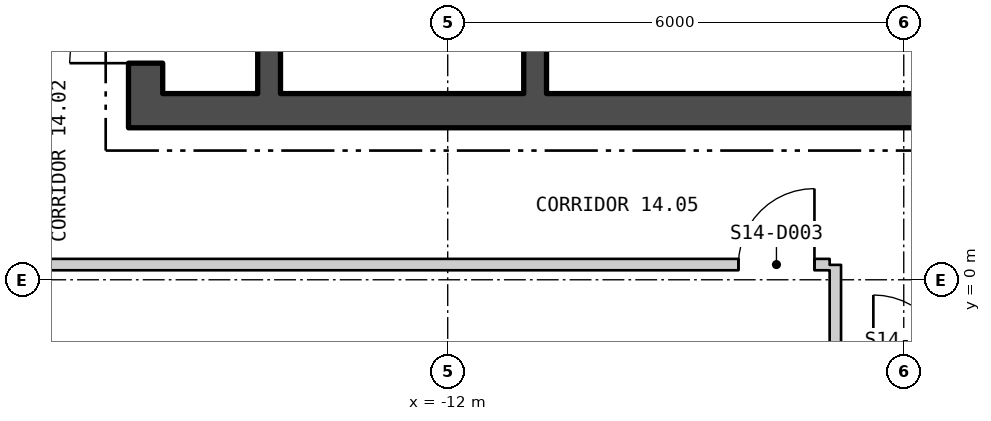
"""IFC4 building model, lengths in metres.
Left out: names, types, materials, properties, quantities, classifications, styles, units other than length and angle.
Written with IfcOpenShell. Run it as: python <this file> out.ifc"""

import sys

from ifc_helpers import new_model, si_unit, direction, frame, frame_2d, origin, place, context, subcontext, project, spatial, polyline, rectangle, outline, extrude, element, fill, save


model = new_model("IFC4")
c1 = context("Model", 3, precision=1e-05, world=origin(), true_north=direction((0.0, 1.0)))
c2 = subcontext(c1, "Body", "Model", "MODEL_VIEW")
j1 = project(units=[si_unit("LENGTHUNIT", "METRE"), si_unit("PLANEANGLEUNIT", "RADIAN")], contexts=[c1])
p1 = place(None, origin())
s1 = spatial("IfcSite", under=j1, at=p1, CompositionType="ELEMENT")
p2 = place(p1, origin())
s2 = spatial("IfcBuilding", under=s1, at=p2, CompositionType="ELEMENT")
p3 = place(p2, frame((0.0, 0.0, 192.6)))
s3 = spatial("IfcBuildingStorey", under=s2, at=p3, CompositionType="ELEMENT", Elevation=192.6)
p4 = place(p3, frame((-26.54, 13.618, -0.18), z_axis=(0.0, 0.0, 1.0), x_axis=(0.499999764979, -0.866025539474, 0.0)))
e1 = element("IfcWall", 1, at=p4, inside=s3, PredefinedType="SOLIDWALL", context=c2, shape_type="SweptSolid", body=[
    extrude(outline(polyline([(-0.13, -0.225), (45.87, -0.225), (45.61, 0.225), (0.13, 0.225), (-0.13, -0.225)])), origin(), (0.0, 0.0, 1.0), 3.68),
])
p5 = place(p4, frame((1.424, 0.0, 1.08)))
e2 = element("IfcOpeningElement", 2, at=p5, cuts=e1, PredefinedType="OPENING", context=c2, shape_type="SweptSolid", body=[
    extrude(rectangle(XDim=2.4, YDim=2.0, at=frame_2d((1.2, 1.0))), frame((0.0, 0.235, 0.0), z_axis=(0.0, -1.0, 0.0), x_axis=(1.0, 0.0, 0.0)), (0.0, 0.0, 1.0), 0.47),
])
p6 = place(p4, frame((5.893, 0.0, 1.08)))
e3 = element("IfcOpeningElement", 3, at=p6, cuts=e1, PredefinedType="OPENING", context=c2, shape_type="SweptSolid", body=[
    extrude(rectangle(XDim=2.4, YDim=2.0, at=frame_2d((1.2, 1.0))), frame((0.0, 0.235, 0.0), z_axis=(0.0, -1.0, 0.0), x_axis=(1.0, 0.0, 0.0)), (0.0, 0.0, 1.0), 0.47),
])
p7 = place(p4, frame((10.401, 0.0, 1.08)))
e4 = element("IfcOpeningElement", 4, at=p7, cuts=e1, PredefinedType="OPENING", context=c2, shape_type="SweptSolid", body=[
    extrude(rectangle(XDim=2.4, YDim=2.0, at=frame_2d((1.2, 1.0))), frame((0.0, 0.235, 0.0), z_axis=(0.0, -1.0, 0.0), x_axis=(1.0, 0.0, 0.0)), (0.0, 0.0, 1.0), 0.47),
])
p8 = place(p4, frame((14.909, 0.0, 1.08)))
e5 = element("IfcOpeningElement", 5, at=p8, cuts=e1, PredefinedType="OPENING", context=c2, shape_type="SweptSolid", body=[
    extrude(rectangle(XDim=2.4, YDim=2.0, at=frame_2d((1.2, 1.0))), frame((0.0, 0.235, 0.0), z_axis=(0.0, -1.0, 0.0), x_axis=(1.0, 0.0, 0.0)), (0.0, 0.0, 1.0), 0.47),
])
p9 = place(p4, frame((19.416, 0.0, 1.08)))
e6 = element("IfcOpeningElement", 6, at=p9, cuts=e1, PredefinedType="OPENING", context=c2, shape_type="SweptSolid", body=[
    extrude(rectangle(XDim=2.4, YDim=2.0, at=frame_2d((1.2, 1.0))), frame((0.0, 0.235, 0.0), z_axis=(0.0, -1.0, 0.0), x_axis=(1.0, 0.0, 0.0)), (0.0, 0.0, 1.0), 0.47),
])
p10 = place(p4, frame((23.924, 0.0, 1.08)))
e7 = element("IfcOpeningElement", 7, at=p10, cuts=e1, PredefinedType="OPENING", context=c2, shape_type="SweptSolid", body=[
    extrude(rectangle(XDim=2.4, YDim=2.0, at=frame_2d((1.2, 1.0))), frame((0.0, 0.235, 0.0), z_axis=(0.0, -1.0, 0.0), x_axis=(1.0, 0.0, 0.0)), (0.0, 0.0, 1.0), 0.47),
])
p11 = place(p4, frame((28.431, 0.0, 1.08)))
e8 = element("IfcOpeningElement", 8, at=p11, cuts=e1, PredefinedType="OPENING", context=c2, shape_type="SweptSolid", body=[
    extrude(rectangle(XDim=2.4, YDim=2.0, at=frame_2d((1.2, 1.0))), frame((0.0, 0.235, 0.0), z_axis=(0.0, -1.0, 0.0), x_axis=(1.0, 0.0, 0.0)), (0.0, 0.0, 1.0), 0.47),
])
p12 = place(p4, frame((32.939, 0.0, 1.08)))
e9 = element("IfcOpeningElement", 9, at=p12, cuts=e1, PredefinedType="OPENING", context=c2, shape_type="SweptSolid", body=[
    extrude(rectangle(XDim=2.4, YDim=2.0, at=frame_2d((1.2, 1.0))), frame((0.0, 0.235, 0.0), z_axis=(0.0, -1.0, 0.0), x_axis=(1.0, 0.0, 0.0)), (0.0, 0.0, 1.0), 0.47),
])
p13 = place(p4, frame((41.916, 0.0, 1.08)))
e10 = element("IfcOpeningElement", 10, at=p13, cuts=e1, PredefinedType="OPENING", context=c2, shape_type="SweptSolid", body=[
    extrude(rectangle(XDim=2.4, YDim=2.0, at=frame_2d((1.2, 1.0))), frame((0.0, 0.235, 0.0), z_axis=(0.0, -1.0, 0.0), x_axis=(1.0, 0.0, 0.0)), (0.0, 0.0, 1.0), 0.47),
])
p14 = place(p3, frame((-16.2, 2.225, 0.0), z_axis=(0.0, 0.0, 1.0), x_axis=(1.0, 0.0, 0.0)))
e11 = element("IfcWall", 11, at=p14, inside=s3, PredefinedType="SHEAR", context=c2, shape_type="SweptSolid", body=[
    extrude(rectangle(XDim=32.4, YDim=0.45, at=frame_2d((16.2, 0.0))), origin(), (0.0, 0.0, 1.0), 3.7),
])
p15 = place(p14, frame((10.7, 0.0, 0.0)))
e12 = element("IfcOpeningElement", 12, at=p15, cuts=e11, PredefinedType="OPENING", context=c2, shape_type="SweptSolid", body=[
    extrude(rectangle(XDim=1.8, YDim=2.4, at=frame_2d((0.9, 1.2))), frame((0.0, 0.235, 0.0), z_axis=(0.0, -1.0, 0.0), x_axis=(1.0, 0.0, 0.0)), (0.0, 0.0, 1.0), 0.47),
])
p16 = place(p14, frame((20.7, 0.0, 0.0)))
e13 = element("IfcOpeningElement", 13, at=p16, cuts=e11, PredefinedType="OPENING", context=c2, shape_type="SweptSolid", body=[
    extrude(rectangle(XDim=1.8, YDim=2.4, at=frame_2d((0.9, 1.2))), frame((0.0, 0.235, 0.0), z_axis=(0.0, -1.0, 0.0), x_axis=(1.0, 0.0, 0.0)), (0.0, 0.0, 1.0), 0.47),
])
p17 = place(p3, frame((-15.975, 2.45, 0.0), z_axis=(0.0, 0.0, 1.0), x_axis=(0.0, 1.0, 0.0)))
e14 = element("IfcWall", 14, at=p17, inside=s3, PredefinedType="SHEAR", context=c2, shape_type="SweptSolid", body=[
    extrude(rectangle(XDim=15.1, YDim=0.45, at=frame_2d((7.55, 0.0))), origin(), (0.0, 0.0, 1.0), 3.7),
])
p18 = place(p17, frame((4.4, 0.0, 0.0)))
e15 = element("IfcOpeningElement", 15, at=p18, cuts=e14, PredefinedType="OPENING", context=c2, shape_type="SweptSolid", body=[
    extrude(rectangle(XDim=1.5, YDim=2.1, at=frame_2d((0.75, 1.05))), frame((0.0, 0.235, 0.0), z_axis=(0.0, -1.0, 0.0), x_axis=(1.0, 0.0, 0.0)), (0.0, 0.0, 1.0), 0.47),
])
p19 = place(p17, frame((0.4, 0.0, 0.0)))
e16 = element("IfcOpeningElement", 16, at=p19, cuts=e14, PredefinedType="OPENING", context=c2, shape_type="SweptSolid", body=[
    extrude(rectangle(XDim=1.0, YDim=2.1, at=frame_2d((0.5, 1.05))), frame((0.0, 0.235, 0.0), z_axis=(0.0, -1.0, 0.0), x_axis=(1.0, 0.0, 0.0)), (0.0, 0.0, 1.0), 0.47),
])
p20 = place(p17, frame((2.5, 0.0, 0.0)))
e17 = element("IfcOpeningElement", 17, at=p20, cuts=e14, PredefinedType="OPENING", context=c2, shape_type="SweptSolid", body=[
    extrude(rectangle(XDim=0.9, YDim=2.1, at=frame_2d((0.45, 1.05))), frame((0.0, 0.235, 0.0), z_axis=(0.0, -1.0, 0.0), x_axis=(1.0, 0.0, 0.0)), (0.0, 0.0, 1.0), 0.47),
])
p21 = place(p17, frame((6.544, 0.0, 0.0)))
e18 = element("IfcOpeningElement", 18, at=p21, cuts=e14, PredefinedType="OPENING", context=c2, shape_type="SweptSolid", body=[
    extrude(rectangle(XDim=0.9, YDim=2.1, at=frame_2d((0.45, 1.05))), frame((0.0, 0.235, 0.0), z_axis=(0.0, -1.0, 0.0), x_axis=(1.0, 0.0, 0.0)), (0.0, 0.0, 1.0), 0.47),
])
p22 = place(p17, frame((11.144, 0.0, 0.0)))
e19 = element("IfcOpeningElement", 19, at=p22, cuts=e14, PredefinedType="OPENING", context=c2, shape_type="SweptSolid", body=[
    extrude(rectangle(XDim=0.9, YDim=2.1, at=frame_2d((0.45, 1.05))), frame((0.0, 0.235, 0.0), z_axis=(0.0, -1.0, 0.0), x_axis=(1.0, 0.0, 0.0)), (0.0, 0.0, 1.0), 0.47),
])
p23 = place(p3, frame((-10.85, 2.45, 0.0), z_axis=(0.0, 0.0, 1.0), x_axis=(0.0, 1.0, 0.0)))
e20 = element("IfcWall", 20, at=p23, inside=s3, PredefinedType="SHEAR", context=c2, shape_type="SweptSolid", body=[
    extrude(rectangle(XDim=15.1, YDim=0.3, at=frame_2d((7.55, 0.0))), origin(), (0.0, 0.0, 1.0), 3.7),
])
p24 = place(p23, frame((3.525, 0.0, 0.0)))
e21 = element("IfcOpeningElement", 21, at=p24, cuts=e20, PredefinedType="OPENING", context=c2, shape_type="SweptSolid", body=[
    extrude(rectangle(XDim=1.25, YDim=2.1, at=frame_2d((0.625, 1.05))), frame((0.0, 0.16, 0.0), z_axis=(0.0, -1.0, 0.0), x_axis=(1.0, 0.0, 0.0)), (0.0, 0.0, 1.0), 0.32),
])
p25 = place(p23, frame((1.15, 0.0, 0.0)))
e22 = element("IfcOpeningElement", 22, at=p25, cuts=e20, PredefinedType="OPENING", context=c2, shape_type="SweptSolid", body=[
    extrude(rectangle(XDim=1.0, YDim=2.1, at=frame_2d((0.5, 1.05))), frame((0.0, 0.16, 0.0), z_axis=(0.0, -1.0, 0.0), x_axis=(1.0, 0.0, 0.0)), (0.0, 0.0, 1.0), 0.32),
])
p26 = place(p3, frame((-14.35, 2.45, 0.0), z_axis=(0.0, 0.0, 1.0), x_axis=(0.0, 1.0, 0.0)))
e23 = element("IfcWall", 23, at=p26, inside=s3, PredefinedType="SHEAR", context=c2, shape_type="SweptSolid", body=[
    extrude(rectangle(XDim=15.1, YDim=0.3, at=frame_2d((7.55, 0.0))), origin(), (0.0, 0.0, 1.0), 3.7),
])
p27 = place(p26, frame((4.4, 0.0, 0.0)))
e24 = element("IfcOpeningElement", 24, at=p27, cuts=e23, PredefinedType="OPENING", context=c2, shape_type="SweptSolid", body=[
    extrude(rectangle(XDim=1.5, YDim=2.1, at=frame_2d((0.75, 1.05))), frame((0.0, 0.16, 0.0), z_axis=(0.0, -1.0, 0.0), x_axis=(1.0, 0.0, 0.0)), (0.0, 0.0, 1.0), 0.32),
])
p28 = place(p3, frame((-17.925, 0.2, 0.0), z_axis=(0.0, 0.0, 1.0), x_axis=(1.0, 0.0, 0.0)))
e25 = element("IfcWall", 25, at=p28, inside=s3, PredefinedType="PARTITIONING", context=c2, shape_type="SweptSolid", body=[
    extrude(rectangle(XDim=10.95, YDim=0.15, at=frame_2d((5.475, 0.0))), origin(), (0.0, 0.0, 1.0), 3.7),
])
p29 = place(p28, frame((9.75, 0.0, 0.0)))
e26 = element("IfcOpeningElement", 26, at=p29, cuts=e25, PredefinedType="OPENING", context=c2, shape_type="SweptSolid", body=[
    extrude(rectangle(XDim=1.0, YDim=2.1, at=frame_2d((0.5, 1.05))), frame((0.0, 0.085, 0.0), z_axis=(0.0, -1.0, 0.0), x_axis=(1.0, 0.0, 0.0)), (0.0, 0.0, 1.0), 0.17),
])
p30 = place(p3, frame((-6.9, -1.125, 0.0), z_axis=(0.0, 0.0, 1.0), x_axis=(0.0, 1.0, 0.0)))
e27 = element("IfcWall", 27, at=p30, inside=s3, PredefinedType="PARTITIONING", context=c2, shape_type="SweptSolid", body=[
    extrude(rectangle(XDim=1.321, YDim=0.15, at=frame_2d((0.66, 0.0))), origin(), (0.0, 0.0, 1.0), 3.7),
])
p31 = place(p19, origin())
e28 = element("IfcDoor", 28, at=p31, inside=s3, OperationType="SINGLE_SWING_RIGHT", PredefinedType="DOOR", context=c2, shape_type="SweptSolid", body=[
    extrude(rectangle(XDim=1.0, YDim=2.1, at=frame_2d((0.5, 1.05))), frame((0.0, 0.025, 0.0), z_axis=(0.0, -1.0, 0.0), x_axis=(1.0, 0.0, 0.0)), (0.0, 0.0, 1.0), 0.05),
])
fill(e16, e28)
p32 = place(p29, origin())
e29 = element("IfcDoor", 29, at=p32, inside=s3, OperationType="SINGLE_SWING_LEFT", PredefinedType="DOOR", context=c2, shape_type="SweptSolid", body=[
    extrude(rectangle(XDim=1.0, YDim=2.1, at=frame_2d((0.5, 1.05))), frame((0.0, 0.025, 0.0), z_axis=(0.0, -1.0, 0.0), x_axis=(1.0, 0.0, 0.0)), (0.0, 0.0, 1.0), 0.05),
])
fill(e26, e29)
save(model, sys.argv[1])
